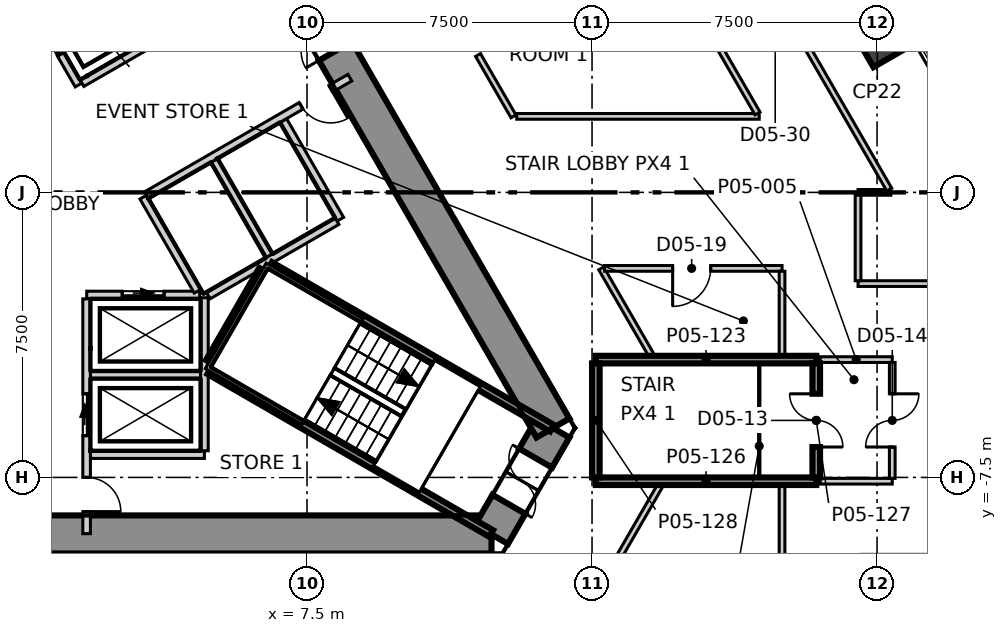
"""IFC4 building model, lengths in metres.
Left out: names, types, materials, properties, quantities, classifications, styles, units other than length and angle.
Written with IfcOpenShell. Run it as: python <this file> out.ifc"""

import sys

from ifc_helpers import new_model, si_unit, direction, frame, frame_2d, origin, origin_2d, place, context, subcontext, project, spatial, polyline, rectangle, outline, extrude, element, fill, save


model = new_model("IFC4")
c1 = context("Model", 3, precision=1e-05, world=origin(), true_north=direction((0.0, 1.0)))
c2 = subcontext(c1, "Body", "Model", "MODEL_VIEW")
j1 = project(units=[si_unit("LENGTHUNIT", "METRE"), si_unit("PLANEANGLEUNIT", "RADIAN")], contexts=[c1])
p1 = place(None, origin())
s1 = spatial("IfcSite", under=j1, at=p1, CompositionType="ELEMENT")
p2 = place(p1, origin())
s2 = spatial("IfcBuilding", under=s1, at=p2, CompositionType="ELEMENT")
p3 = place(p2, frame((0.0, 0.0, 30.3)))
s3 = spatial("IfcBuildingStorey", under=s2, at=p3, CompositionType="ELEMENT", Elevation=30.3)
p4 = place(p3, frame((-12.355, -9.0, -0.4), z_axis=(0.0, 0.0, 1.0), x_axis=(1.0, 0.0, 0.0)))
e1 = element("IfcWall", 1, at=p4, inside=s3, PredefinedType="SHEAR", context=c2, shape_type="SweptSolid", body=[
    extrude(outline(polyline([(-0.289, -0.5), (1.656, -0.5), (3.601, -0.5), (5.547, -0.5), (7.492, -0.5), (9.437, -0.5), (11.382, -0.5), (13.328, -0.5), (15.273, -0.5), (17.218, -0.5), (19.163, -0.5), (21.109, -0.5), (23.054, -0.5), (24.999, -0.5), (24.422, 0.5), (22.566, 0.5), (20.709, 0.5), (18.853, 0.5), (16.996, 0.5), (15.14, 0.5), (13.283, 0.5), (11.427, 0.5), (9.57, 0.5), (7.714, 0.5), (5.857, 0.5), (4.001, 0.5), (2.145, 0.5), (0.288, 0.5), (-0.289, -0.5)])), origin(), (0.0, 0.0, 1.0), 5.1),
])
p5 = place(p3, frame((12.355, -9.0, -0.4), z_axis=(0.0, 0.0, 1.0), x_axis=(0.500077567175, 0.865980615723, 0.0)))
e2 = element("IfcWall", 2, at=p5, inside=s3, PredefinedType="SHEAR", context=c2, shape_type="SweptSolid", body=[
    extrude(outline(polyline([(-0.288, -0.5), (1.617, -0.5), (3.522, -0.5), (2.945, 0.5), (1.617, 0.5), (0.289, 0.499), (-0.288, -0.5)])), origin(), (0.0, 0.0, 1.0), 5.1),
])
p6 = place(p5, frame((0.917, 0.0, 0.4)))
e3 = element("IfcOpeningElement", 3, at=p6, cuts=e2, PredefinedType="OPENING", context=c2, shape_type="SweptSolid", body=[
    extrude(rectangle(XDim=1.4, YDim=2.1, at=frame_2d((0.7, 1.05))), frame((0.0, 0.51, 0.0), z_axis=(0.0, -1.0, 0.0), x_axis=(1.0, 0.0, 0.0)), (0.0, 0.0, 1.0), 1.02),
])
p7 = place(p3, frame((13.972, -6.2, -0.4), z_axis=(0.0, 0.0, 1.0), x_axis=(-0.499992141631, 0.866029940768, 0.0)))
e4 = element("IfcWall", 4, at=p7, inside=s3, PredefinedType="SHEAR", context=c2, shape_type="SweptSolid", body=[
    extrude(outline(polyline([(-0.288, -0.5), (1.657, -0.5), (3.602, -0.5), (5.547, -0.5), (7.493, -0.5), (9.438, -0.5), (11.383, -0.5), (13.328, -0.5), (15.273, -0.5), (17.218, -0.499), (19.164, -0.499), (21.109, -0.499), (23.054, -0.499), (24.999, -0.499), (24.422, 0.5), (22.566, 0.5), (20.709, 0.5), (18.853, 0.5), (16.996, 0.5), (15.14, 0.5), (13.283, 0.5), (11.427, 0.5), (9.57, 0.5), (7.714, 0.5), (5.857, 0.5), (4.001, 0.5), (2.145, 0.5), (0.288, 0.5), (-0.288, -0.5)])), origin(), (0.0, 0.0, 1.0), 5.1),
])
p8 = place(p7, frame((11.455, 0.0, 0.4)))
e5 = element("IfcOpeningElement", 5, at=p8, cuts=e4, PredefinedType="OPENING", context=c2, shape_type="SweptSolid", body=[
    extrude(rectangle(XDim=1.8, YDim=2.1, at=frame_2d((0.9, 1.05))), frame((0.0, 0.51, 0.0), z_axis=(0.0, -1.0, 0.0), x_axis=(1.0, 0.0, 0.0)), (0.0, 0.0, 1.0), 1.02),
])
p9 = place(p3, frame((22.506, 4.219, -0.4), z_axis=(0.0, 0.0, 1.0), x_axis=(-0.5, 0.866025403784, 0.0)))
e6 = element("IfcColumn", 6, at=p9, inside=s3, PredefinedType="COLUMN", context=c2, shape_type="SweptSolid", body=[
    extrude(rectangle(XDim=1.5, YDim=1.1, at=origin_2d()), origin(), (0.0, 0.0, 1.0), 5.1),
])
for number, where, z_axis, x_axis in (
    (7, (21.0, -7.6, 0.0), (0.0, 0.0, 1.0), (1.0, 0.0, 0.0)),
    (8, (21.0, -4.4, 0.0), (0.0, 0.0, 1.0), (1.0, 0.0, 0.0)),
):
    element("IfcWall", number, at=place(p3, frame(where, z_axis=z_axis, x_axis=x_axis)), inside=s3, PredefinedType="PARTITIONING", context=c2, shape_type="SweptSolid", body=[
        extrude(rectangle(XDim=1.9, YDim=0.15, at=frame_2d((0.95, 0.0))), origin(), (0.0, 0.0, 1.0), 4.7),
    ])
p10 = place(p3, frame((22.9, -7.525, 0.0), z_axis=(0.0, 0.0, 1.0), x_axis=(0.0, 1.0, 0.0)))
e9 = element("IfcWall", 9, at=p10, inside=s3, PredefinedType="PARTITIONING", context=c2, shape_type="SweptSolid", body=[
    extrude(rectangle(XDim=3.05, YDim=0.15, at=frame_2d((1.525, 0.0))), origin(), (0.0, 0.0, 1.0), 4.7),
])
p11 = place(p10, frame((0.825, 0.0, 0.0)))
e10 = element("IfcOpeningElement", 10, at=p11, cuts=e9, PredefinedType="OPENING", context=c2, shape_type="SweptSolid", body=[
    extrude(rectangle(XDim=1.4, YDim=2.1, at=frame_2d((0.7, 1.05))), frame((0.0, 0.085, 0.0), z_axis=(0.0, -1.0, 0.0), x_axis=(1.0, 0.0, 0.0)), (0.0, 0.0, 1.0), 0.17),
])
p12 = place(p3, frame((22.0, 0.0, 0.0), z_axis=(0.0, 0.0, 1.0), x_axis=(1.0, 0.0, 0.0)))
e11 = element("IfcWall", 11, at=p12, inside=s3, PredefinedType="PARTITIONING", context=c2, shape_type="SweptSolid", body=[
    extrude(rectangle(XDim=0.863, YDim=0.15, at=frame_2d((0.432, 0.0))), origin(), (0.0, 0.0, 1.0), 4.7),
])
p13 = place(p3, frame((22.0, -2.4, 0.0), z_axis=(0.0, 0.0, 1.0), x_axis=(1.0, 0.0, 0.0)))
e12 = element("IfcWall", 12, at=p13, inside=s3, PredefinedType="PARTITIONING", context=c2, shape_type="SweptSolid", body=[
    extrude(rectangle(XDim=2.9, YDim=0.15, at=frame_2d((1.45, 0.0))), origin(), (0.0, 0.0, 1.0), 4.1),
])
p14 = place(p3, frame((22.0, -2.325, 0.0), z_axis=(0.0, 0.0, 1.0), x_axis=(0.0, 1.0, 0.0)))
e13 = element("IfcWall", 13, at=p14, inside=s3, PredefinedType="PARTITIONING", context=c2, shape_type="SweptSolid", body=[
    extrude(rectangle(XDim=2.25, YDim=0.15, at=frame_2d((1.125, 0.0))), origin(), (0.0, 0.0, 1.0), 4.7),
])
p15 = place(p3, frame((15.935, 12.0, 0.0), z_axis=(0.0, 0.0, 1.0), x_axis=(0.500004336333, -0.866022900187, 0.0)))
e14 = element("IfcWall", 14, at=p15, inside=s3, PredefinedType="PARTITIONING", context=c2, shape_type="SweptSolid", body=[
    extrude(rectangle(XDim=13.77, YDim=0.15, at=frame_2d((6.885, 0.0))), origin(), (0.0, 0.0, 1.0), 4.7),
])
p16 = place(p15, frame((7.27, 0.0, 0.0)))
e15 = element("IfcOpeningElement", 15, at=p16, cuts=e14, PredefinedType="OPENING", context=c2, shape_type="SweptSolid", body=[
    extrude(rectangle(XDim=1.0, YDim=2.1, at=frame_2d((0.5, 1.05))), frame((0.0, 0.085, 0.0), z_axis=(0.0, -1.0, 0.0), x_axis=(1.0, 0.0, 0.0)), (0.0, 0.0, 1.0), 0.17),
])
p17 = place(p3, frame((12.0, 3.615, 0.0), z_axis=(0.0, 0.0, 1.0), x_axis=(0.500277597875, -0.865865073245, 0.0)))
e16 = element("IfcWall", 16, at=p17, inside=s3, PredefinedType="PARTITIONING", context=c2, shape_type="SweptSolid", body=[
    extrude(rectangle(XDim=1.865, YDim=0.15, at=frame_2d((0.933, 0.0))), origin(), (0.0, 0.0, 1.0), 4.7),
])
p18 = place(p3, frame((15.242, -2.0, 0.0), z_axis=(0.0, 0.0, 1.0), x_axis=(0.500053987897, -0.865994231614, 0.0)))
e17 = element("IfcWall", 17, at=p18, inside=s3, PredefinedType="PARTITIONING", context=c2, shape_type="SweptSolid", body=[
    extrude(rectangle(XDim=2.656, YDim=0.15, at=frame_2d((1.328, 0.0))), origin(), (0.0, 0.0, 1.0), 4.7),
])
p19 = place(p3, frame((15.329, -2.0, 0.0), z_axis=(0.0, 0.0, 1.0), x_axis=(1.0, 0.0, 0.0)))
e18 = element("IfcWall", 18, at=p19, inside=s3, PredefinedType="PARTITIONING", context=c2, shape_type="SweptSolid", body=[
    extrude(rectangle(XDim=4.671, YDim=0.15, at=frame_2d((2.335, 0.0))), origin(), (0.0, 0.0, 1.0), 4.1),
])
p20 = place(p19, frame((1.792, 0.0, 0.0)))
e19 = element("IfcOpeningElement", 19, at=p20, cuts=e18, PredefinedType="OPENING", context=c2, shape_type="SweptSolid", body=[
    extrude(rectangle(XDim=1.0, YDim=2.1, at=frame_2d((0.5, 1.05))), frame((0.0, 0.085, 0.0), z_axis=(0.0, -1.0, 0.0), x_axis=(1.0, 0.0, 0.0)), (0.0, 0.0, 1.0), 0.17),
])
p21 = place(p3, frame((20.0, -16.925, 0.0), z_axis=(0.0, 0.0, 1.0), x_axis=(0.0, 1.0, 0.0)))
e20 = element("IfcWall", 20, at=p21, inside=s3, PredefinedType="PARTITIONING", context=c2, shape_type="SweptSolid", body=[
    extrude(rectangle(XDim=9.225, YDim=0.15, at=frame_2d((4.613, 0.0))), origin(), (0.0, 0.0, 1.0), 4.7),
])
p22 = place(p3, frame((20.0, -4.3, 0.0), z_axis=(0.0, 0.0, 1.0), x_axis=(0.0, 1.0, 0.0)))
e21 = element("IfcWall", 21, at=p22, inside=s3, PredefinedType="PARTITIONING", context=c2, shape_type="SweptSolid", body=[
    extrude(rectangle(XDim=2.225, YDim=0.15, at=frame_2d((1.113, 0.0))), origin(), (0.0, 0.0, 1.0), 4.7),
])
p23 = place(p3, frame((14.246, -12.125, 0.0), z_axis=(0.0, 0.0, 1.0), x_axis=(0.500018862428, 0.866014513283, 0.0)))
e22 = element("IfcWall", 22, at=p23, inside=s3, PredefinedType="PARTITIONING", context=c2, shape_type="SweptSolid", body=[
    extrude(rectangle(XDim=5.11, YDim=0.15, at=frame_2d((2.555, 0.0))), origin(), (0.0, 0.0, 1.0), 4.7),
])
p24 = place(p3, frame((13.019, 2.0, 0.0), z_axis=(0.0, 0.0, 1.0), x_axis=(1.0, 0.0, 0.0)))
e23 = element("IfcWall", 23, at=p24, inside=s3, PredefinedType="PARTITIONING", context=c2, shape_type="SweptSolid", body=[
    extrude(rectangle(XDim=6.38, YDim=0.15, at=frame_2d((3.19, 0.0))), origin(), (0.0, 0.0, 1.0), 4.7),
])
p25 = place(p3, frame((14.823, 9.925, 0.0), z_axis=(0.0, 0.0, 1.0), x_axis=(0.500058162134, -0.865991821256, 0.0)))
e24 = element("IfcWall", 24, at=p25, inside=s3, PredefinedType="PARTITIONING", context=c2, shape_type="SweptSolid", body=[
    extrude(rectangle(XDim=9.065, YDim=0.15, at=frame_2d((4.532, 0.0))), origin(), (0.0, 0.0, 1.0), 4.7),
])
p26 = place(p25, frame((4.032, 0.0, 0.0)))
e25 = element("IfcOpeningElement", 25, at=p26, cuts=e24, PredefinedType="OPENING", context=c2, shape_type="SweptSolid", body=[
    extrude(rectangle(XDim=1.0, YDim=2.1, at=frame_2d((0.5, 1.05))), frame((0.0, 0.085, 0.0), z_axis=(0.0, -1.0, 0.0), x_axis=(1.0, 0.0, 0.0)), (0.0, 0.0, 1.0), 0.17),
])
p27 = place(p3, frame((1.8, -6.9, 0.0), z_axis=(0.0, 0.0, 1.0), x_axis=(1.0, 0.0, 0.0)))
e26 = element("IfcWall", 26, at=p27, inside=s3, PredefinedType="SOLIDWALL", context=c2, shape_type="SweptSolid", body=[
    extrude(rectangle(XDim=3.0, YDim=0.2, at=frame_2d((1.5, 0.0))), origin(), (0.0, 0.0, 1.0), 4.7),
])
p28 = place(p3, frame((1.8, -4.8, 0.0), z_axis=(0.0, 0.0, 1.0), x_axis=(1.0, 0.0, 0.0)))
e27 = element("IfcWall", 27, at=p28, inside=s3, PredefinedType="SOLIDWALL", context=c2, shape_type="SweptSolid", body=[
    extrude(rectangle(XDim=2.9, YDim=0.2, at=frame_2d((1.45, 0.0))), origin(), (0.0, 0.0, 1.0), 4.7),
])
p29 = place(p3, frame((1.703, -2.7, 0.0), z_axis=(0.0, 0.0, 1.0), x_axis=(1.0, 0.0, 0.0)))
e28 = element("IfcWall", 28, at=p29, inside=s3, PredefinedType="SOLIDWALL", context=c2, shape_type="SweptSolid", body=[
    extrude(rectangle(XDim=2.973, YDim=0.2, at=frame_2d((1.487, 0.0))), origin(), (0.0, 0.0, 1.0), 4.7),
])
p30 = place(p29, frame((0.936, 0.0, 0.0)))
e29 = element("IfcOpeningElement", 29, at=p30, cuts=e28, PredefinedType="OPENING", context=c2, shape_type="SweptSolid", body=[
    extrude(rectangle(XDim=1.1, YDim=2.1, at=frame_2d((0.55, 1.05))), frame((0.0, 0.11, 0.0), z_axis=(0.0, -1.0, 0.0), x_axis=(1.0, 0.0, 0.0)), (0.0, 0.0, 1.0), 0.22),
])
p31 = place(p3, frame((0.0, 5.4, 0.0), z_axis=(0.0, 0.0, 1.0), x_axis=(0.500103862429, -0.865965430478, 0.0)))
e30 = element("IfcWall", 30, at=p31, inside=s3, PredefinedType="SOLIDWALL", context=c2, shape_type="SweptSolid", body=[
    extrude(rectangle(XDim=2.973, YDim=0.2, at=frame_2d((1.487, 0.0))), origin(), (0.0, 0.0, 1.0), 4.7),
])
p32 = place(p31, frame((0.937, 0.0, 0.0)))
e31 = element("IfcOpeningElement", 31, at=p32, cuts=e30, PredefinedType="OPENING", context=c2, shape_type="SweptSolid", body=[
    extrude(rectangle(XDim=1.1, YDim=2.1, at=frame_2d((0.55, 1.05))), frame((0.0, 0.11, 0.0), z_axis=(0.0, -1.0, 0.0), x_axis=(1.0, 0.0, 0.0)), (0.0, 0.0, 1.0), 0.22),
])
p33 = place(p3, frame((3.19, -0.125, 0.0), z_axis=(0.0, 0.0, 1.0), x_axis=(0.499988658015, -0.866031951983, 0.0)))
e32 = element("IfcWall", 32, at=p33, inside=s3, PredefinedType="SOLIDWALL", context=c2, shape_type="SweptSolid", body=[
    extrude(rectangle(XDim=2.858, YDim=0.2, at=frame_2d((1.429, 0.0))), origin(), (0.0, 0.0, 1.0), 4.7),
])
p34 = place(p3, frame((1.578, 2.874, 0.0), z_axis=(0.0, 0.0, 1.0), x_axis=(0.866055259465, 0.499948284879, 0.0)))
e33 = element("IfcWall", 33, at=p34, inside=s3, PredefinedType="SOLIDWALL", context=c2, shape_type="SweptSolid", body=[
    extrude(rectangle(XDim=6.177, YDim=0.2, at=frame_2d((3.088, 0.0))), origin(), (0.0, 0.0, 1.0), 4.7),
])
p35 = place(p34, frame((2.496, 0.0, 0.0)))
e34 = element("IfcOpeningElement", 34, at=p35, cuts=e33, PredefinedType="OPENING", context=c2, shape_type="SweptSolid", body=[
    extrude(rectangle(XDim=1.1, YDim=2.1, at=frame_2d((0.55, 1.05))), frame((0.0, 0.11, 0.0), z_axis=(0.0, -1.0, 0.0), x_axis=(1.0, 0.0, 0.0)), (0.0, 0.0, 1.0), 0.22),
])
p36 = place(p34, frame((4.696, 0.0, 0.0)))
e35 = element("IfcOpeningElement", 35, at=p36, cuts=e33, PredefinedType="OPENING", context=c2, shape_type="SweptSolid", body=[
    extrude(rectangle(XDim=0.9, YDim=2.1, at=frame_2d((0.45, 1.05))), frame((0.0, 0.11, 0.0), z_axis=(0.0, -1.0, 0.0), x_axis=(1.0, 0.0, 0.0)), (0.0, 0.0, 1.0), 0.22),
])
p37 = place(p3, frame((1.7, -8.98, 0.0), z_axis=(0.0, 0.0, 1.0), x_axis=(0.0, 1.0, 0.0)))
e36 = element("IfcWall", 36, at=p37, inside=s3, PredefinedType="SOLIDWALL", context=c2, shape_type="SweptSolid", body=[
    extrude(rectangle(XDim=6.177, YDim=0.2, at=frame_2d((3.088, 0.0))), origin(), (0.0, 0.0, 1.0), 4.7),
])
p38 = place(p37, frame((2.58, 0.0, 0.0)))
e37 = element("IfcOpeningElement", 37, at=p38, cuts=e36, PredefinedType="OPENING", context=c2, shape_type="SweptSolid", body=[
    extrude(rectangle(XDim=1.1, YDim=2.1, at=frame_2d((0.55, 1.05))), frame((0.0, 0.11, 0.0), z_axis=(0.0, -1.0, 0.0), x_axis=(1.0, 0.0, 0.0)), (0.0, 0.0, 1.0), 0.22),
])
p39 = place(p37, frame((0.58, 0.0, 0.0)))
e38 = element("IfcOpeningElement", 38, at=p39, cuts=e36, PredefinedType="OPENING", context=c2, shape_type="SweptSolid", body=[
    extrude(rectangle(XDim=0.9, YDim=2.1, at=frame_2d((0.45, 1.05))), frame((0.0, 0.11, 0.0), z_axis=(0.0, -1.0, 0.0), x_axis=(1.0, 0.0, 0.0)), (0.0, 0.0, 1.0), 0.22),
])
p40 = place(p3, frame((4.8, -6.8, 0.0), z_axis=(0.0, 0.0, 1.0), x_axis=(0.0, 1.0, 0.0)))
e39 = element("IfcWall", 39, at=p40, inside=s3, PredefinedType="SOLIDWALL", context=c2, shape_type="SweptSolid", body=[
    extrude(rectangle(XDim=4.029, YDim=0.2, at=frame_2d((2.015, 0.0))), origin(), (0.0, 0.0, 1.0), 4.7),
])
p41 = place(p3, frame((5.057, 0.841, 0.0), z_axis=(0.0, 0.0, 1.0), x_axis=(0.50012328804, -0.865954211699, 0.0)))
e40 = element("IfcWall", 40, at=p41, inside=s3, PredefinedType="SOLIDWALL", context=c2, shape_type="SweptSolid", body=[
    extrude(rectangle(XDim=2.9, YDim=0.2, at=frame_2d((1.45, 0.0))), origin(), (0.0, 0.0, 1.0), 4.7),
])
p42 = place(p3, frame((6.876, 1.891, 0.0), z_axis=(0.0, 0.0, 1.0), x_axis=(0.499990139034, -0.866031096941, 0.0)))
e41 = element("IfcWall", 41, at=p42, inside=s3, PredefinedType="SOLIDWALL", context=c2, shape_type="SweptSolid", body=[
    extrude(rectangle(XDim=3.0, YDim=0.2, at=frame_2d((1.5, 0.0))), origin(), (0.0, 0.0, 1.0), 4.7),
])
p43 = place(p3, frame((3.278, -0.071, 0.0), z_axis=(0.0, 0.0, 1.0), x_axis=(0.865959795517, 0.500113619639, 0.0)))
e42 = element("IfcWall", 42, at=p43, inside=s3, PredefinedType="SOLIDWALL", context=c2, shape_type="SweptSolid", body=[
    extrude(rectangle(XDim=6.177, YDim=0.2, at=frame_2d((3.088, 0.0))), origin(), (0.0, 0.0, 1.0), 4.7),
])
p44 = place(p43, frame((4.697, 0.0, 0.0)))
e43 = element("IfcOpeningElement", 43, at=p44, cuts=e42, PredefinedType="OPENING", context=c2, shape_type="SweptSolid", body=[
    extrude(rectangle(XDim=0.9, YDim=2.1, at=frame_2d((0.45, 1.05))), frame((0.0, 0.11, 0.0), z_axis=(0.0, -1.0, 0.0), x_axis=(1.0, 0.0, 0.0)), (0.0, 0.0, 1.0), 0.22),
])
p45 = place(p3, frame((4.9, -2.714, 0.0), z_axis=(0.0, 0.0, 1.0), x_axis=(0.865992350556, 0.500057245502, 0.0)))
e44 = element("IfcWall", 44, at=p45, inside=s3, PredefinedType="SOLIDWALL", context=c2, shape_type="SweptSolid", body=[
    extrude(rectangle(XDim=3.914, YDim=0.2, at=frame_2d((1.957, 0.0))), origin(), (0.0, 0.0, 1.0), 4.7),
])
p46 = place(p3, frame((4.929, -4.462, 0.0), z_axis=(0.0, 0.0, 1.0), x_axis=(0.500200581029, 0.865909567298, 0.0)))
e45 = element("IfcWall", 45, at=p46, inside=s3, PredefinedType="SOLIDWALL", context=c2, shape_type="SweptSolid", body=[
    extrude(rectangle(XDim=2.799, YDim=0.2, at=frame_2d((1.399, 0.0))), origin(), (0.0, 0.0, 1.0), 4.7),
])
p47 = place(p3, frame((6.529, -1.922, 0.0), z_axis=(0.0, 0.0, 1.0), x_axis=(0.866036527536, -0.499980732602, 0.0)))
e46 = element("IfcWall", 46, at=p47, inside=s3, PredefinedType="SOLIDWALL", context=c2, shape_type="SweptSolid", body=[
    extrude(rectangle(XDim=8.564, YDim=0.2, at=frame_2d((4.282, 0.0))), origin(), (0.0, 0.0, 1.0), 4.7),
])
p48 = place(p3, frame((4.929, -4.693, 0.0), z_axis=(0.0, 0.0, 1.0), x_axis=(0.865987152174, -0.50006624788, 0.0)))
e47 = element("IfcWall", 47, at=p48, inside=s3, PredefinedType="SOLIDWALL", context=c2, shape_type="SweptSolid", body=[
    extrude(rectangle(XDim=8.565, YDim=0.2, at=frame_2d((4.282, 0.0))), origin(), (0.0, 0.0, 1.0), 4.7),
])
for number, where, z_axis, x_axis in (
    (48, (15.1, -4.4, 0.0), (0.0, 0.0, 1.0), (1.0, 0.0, 0.0)),
    (49, (15.1, -7.6, 0.0), (0.0, 0.0, 1.0), (1.0, 0.0, 0.0)),
):
    element("IfcWall", number, at=place(p3, frame(where, z_axis=z_axis, x_axis=x_axis)), inside=s3, PredefinedType="SOLIDWALL", context=c2, shape_type="SweptSolid", body=[
        extrude(rectangle(XDim=5.8, YDim=0.2, at=frame_2d((2.9, 0.0))), origin(), (0.0, 0.0, 1.0), 4.7),
    ])
p49 = place(p3, frame((20.9, -7.5, 0.0), z_axis=(0.0, 0.0, 1.0), x_axis=(0.0, 1.0, 0.0)))
e50 = element("IfcWall", 50, at=p49, inside=s3, PredefinedType="SOLIDWALL", context=c2, shape_type="SweptSolid", body=[
    extrude(rectangle(XDim=3.0, YDim=0.2, at=frame_2d((1.5, 0.0))), origin(), (0.0, 0.0, 1.0), 4.7),
])
p50 = place(p49, frame((0.8, 0.0, 0.0)))
e51 = element("IfcOpeningElement", 51, at=p50, cuts=e50, PredefinedType="OPENING", context=c2, shape_type="SweptSolid", body=[
    extrude(rectangle(XDim=1.4, YDim=2.1, at=frame_2d((0.7, 1.05))), frame((0.0, 0.11, 0.0), z_axis=(0.0, -1.0, 0.0), x_axis=(1.0, 0.0, 0.0)), (0.0, 0.0, 1.0), 0.22),
])
p51 = place(p3, frame((15.1, -7.5, 0.0), z_axis=(0.0, 0.0, 1.0), x_axis=(0.0, 1.0, 0.0)))
e52 = element("IfcWall", 52, at=p51, inside=s3, PredefinedType="SOLIDWALL", context=c2, shape_type="SweptSolid", body=[
    extrude(rectangle(XDim=3.0, YDim=0.2, at=frame_2d((1.5, 0.0))), origin(), (0.0, 0.0, 1.0), 4.7),
])
p52 = place(p30, origin())
e53 = element("IfcDoor", 53, at=p52, inside=s3, OperationType="SLIDING_TO_LEFT", PredefinedType="DOOR", context=c2, shape_type="SweptSolid", body=[
    extrude(rectangle(XDim=1.1, YDim=2.1, at=frame_2d((0.55, 1.05))), frame((0.0, 0.025, 0.0), z_axis=(0.0, -1.0, 0.0), x_axis=(1.0, 0.0, 0.0)), (0.0, 0.0, 1.0), 0.05),
])
fill(e29, e53)
p53 = place(p38, origin())
e54 = element("IfcDoor", 54, at=p53, inside=s3, OperationType="SLIDING_TO_LEFT", PredefinedType="DOOR", context=c2, shape_type="SweptSolid", body=[
    extrude(rectangle(XDim=1.1, YDim=2.1, at=frame_2d((0.55, 1.05))), frame((0.0, 0.025, 0.0), z_axis=(0.0, -1.0, 0.0), x_axis=(1.0, 0.0, 0.0)), (0.0, 0.0, 1.0), 0.05),
])
fill(e37, e54)
p54 = place(p32, origin())
e55 = element("IfcDoor", 55, at=p54, inside=s3, OperationType="SLIDING_TO_LEFT", PredefinedType="DOOR", context=c2, shape_type="SweptSolid", body=[
    extrude(rectangle(XDim=1.1, YDim=2.1, at=frame_2d((0.55, 1.05))), frame((0.0, 0.025, 0.0), z_axis=(0.0, -1.0, 0.0), x_axis=(1.0, 0.0, 0.0)), (0.0, 0.0, 1.0), 0.05),
])
fill(e31, e55)
p55 = place(p50, origin())
e56 = element("IfcDoor", 56, at=p55, inside=s3, OperationType="DOUBLE_DOOR_SINGLE_SWING", PredefinedType="DOOR", context=c2, shape_type="SweptSolid", body=[
    extrude(rectangle(XDim=1.4, YDim=2.1, at=frame_2d((0.7, 1.05))), frame((0.0, 0.025, 0.0), z_axis=(0.0, -1.0, 0.0), x_axis=(1.0, 0.0, 0.0)), (0.0, 0.0, 1.0), 0.05),
])
fill(e51, e56)
p56 = place(p11, origin())
e57 = element("IfcDoor", 57, at=p56, inside=s3, OperationType="DOUBLE_DOOR_SINGLE_SWING", PredefinedType="DOOR", context=c2, shape_type="SweptSolid", body=[
    extrude(rectangle(XDim=1.4, YDim=2.1, at=frame_2d((0.7, 1.05))), frame((0.0, 0.025, 0.0), z_axis=(0.0, -1.0, 0.0), x_axis=(1.0, 0.0, 0.0)), (0.0, 0.0, 1.0), 0.05),
])
fill(e10, e57)
p57 = place(p20, origin())
e58 = element("IfcDoor", 58, at=p57, inside=s3, OperationType="SINGLE_SWING_LEFT", PredefinedType="DOOR", context=c2, shape_type="SweptSolid", body=[
    extrude(rectangle(XDim=1.0, YDim=2.1, at=frame_2d((0.5, 1.05))), frame((0.0, 0.025, 0.0), z_axis=(0.0, -1.0, 0.0), x_axis=(1.0, 0.0, 0.0)), (0.0, 0.0, 1.0), 0.05),
])
fill(e19, e58)
p58 = place(p6, origin())
e59 = element("IfcDoor", 59, at=p58, inside=s3, OperationType="DOUBLE_DOOR_SINGLE_SWING", PredefinedType="DOOR", context=c2, shape_type="SweptSolid", body=[
    extrude(rectangle(XDim=1.4, YDim=2.1, at=frame_2d((0.7, 1.05))), frame((0.0, 0.025, 0.0), z_axis=(0.0, -1.0, 0.0), x_axis=(1.0, 0.0, 0.0)), (0.0, 0.0, 1.0), 0.05),
])
fill(e3, e59)
p59 = place(p39, origin())
e60 = element("IfcDoor", 60, at=p59, inside=s3, OperationType="SINGLE_SWING_LEFT", PredefinedType="DOOR", context=c2, shape_type="SweptSolid", body=[
    extrude(rectangle(XDim=0.9, YDim=2.1, at=frame_2d((0.45, 1.05))), frame((0.0, 0.025, 0.0), z_axis=(0.0, -1.0, 0.0), x_axis=(1.0, 0.0, 0.0)), (0.0, 0.0, 1.0), 0.05),
])
fill(e38, e60)
p60 = place(p44, origin())
e61 = element("IfcDoor", 61, at=p60, inside=s3, OperationType="SINGLE_SWING_RIGHT", PredefinedType="DOOR", context=c2, shape_type="SweptSolid", body=[
    extrude(rectangle(XDim=0.9, YDim=2.1, at=frame_2d((0.45, 1.05))), frame((0.0, 0.025, 0.0), z_axis=(0.0, -1.0, 0.0), x_axis=(1.0, 0.0, 0.0)), (0.0, 0.0, 1.0), 0.05),
])
fill(e43, e61)
save(model, sys.argv[1])
